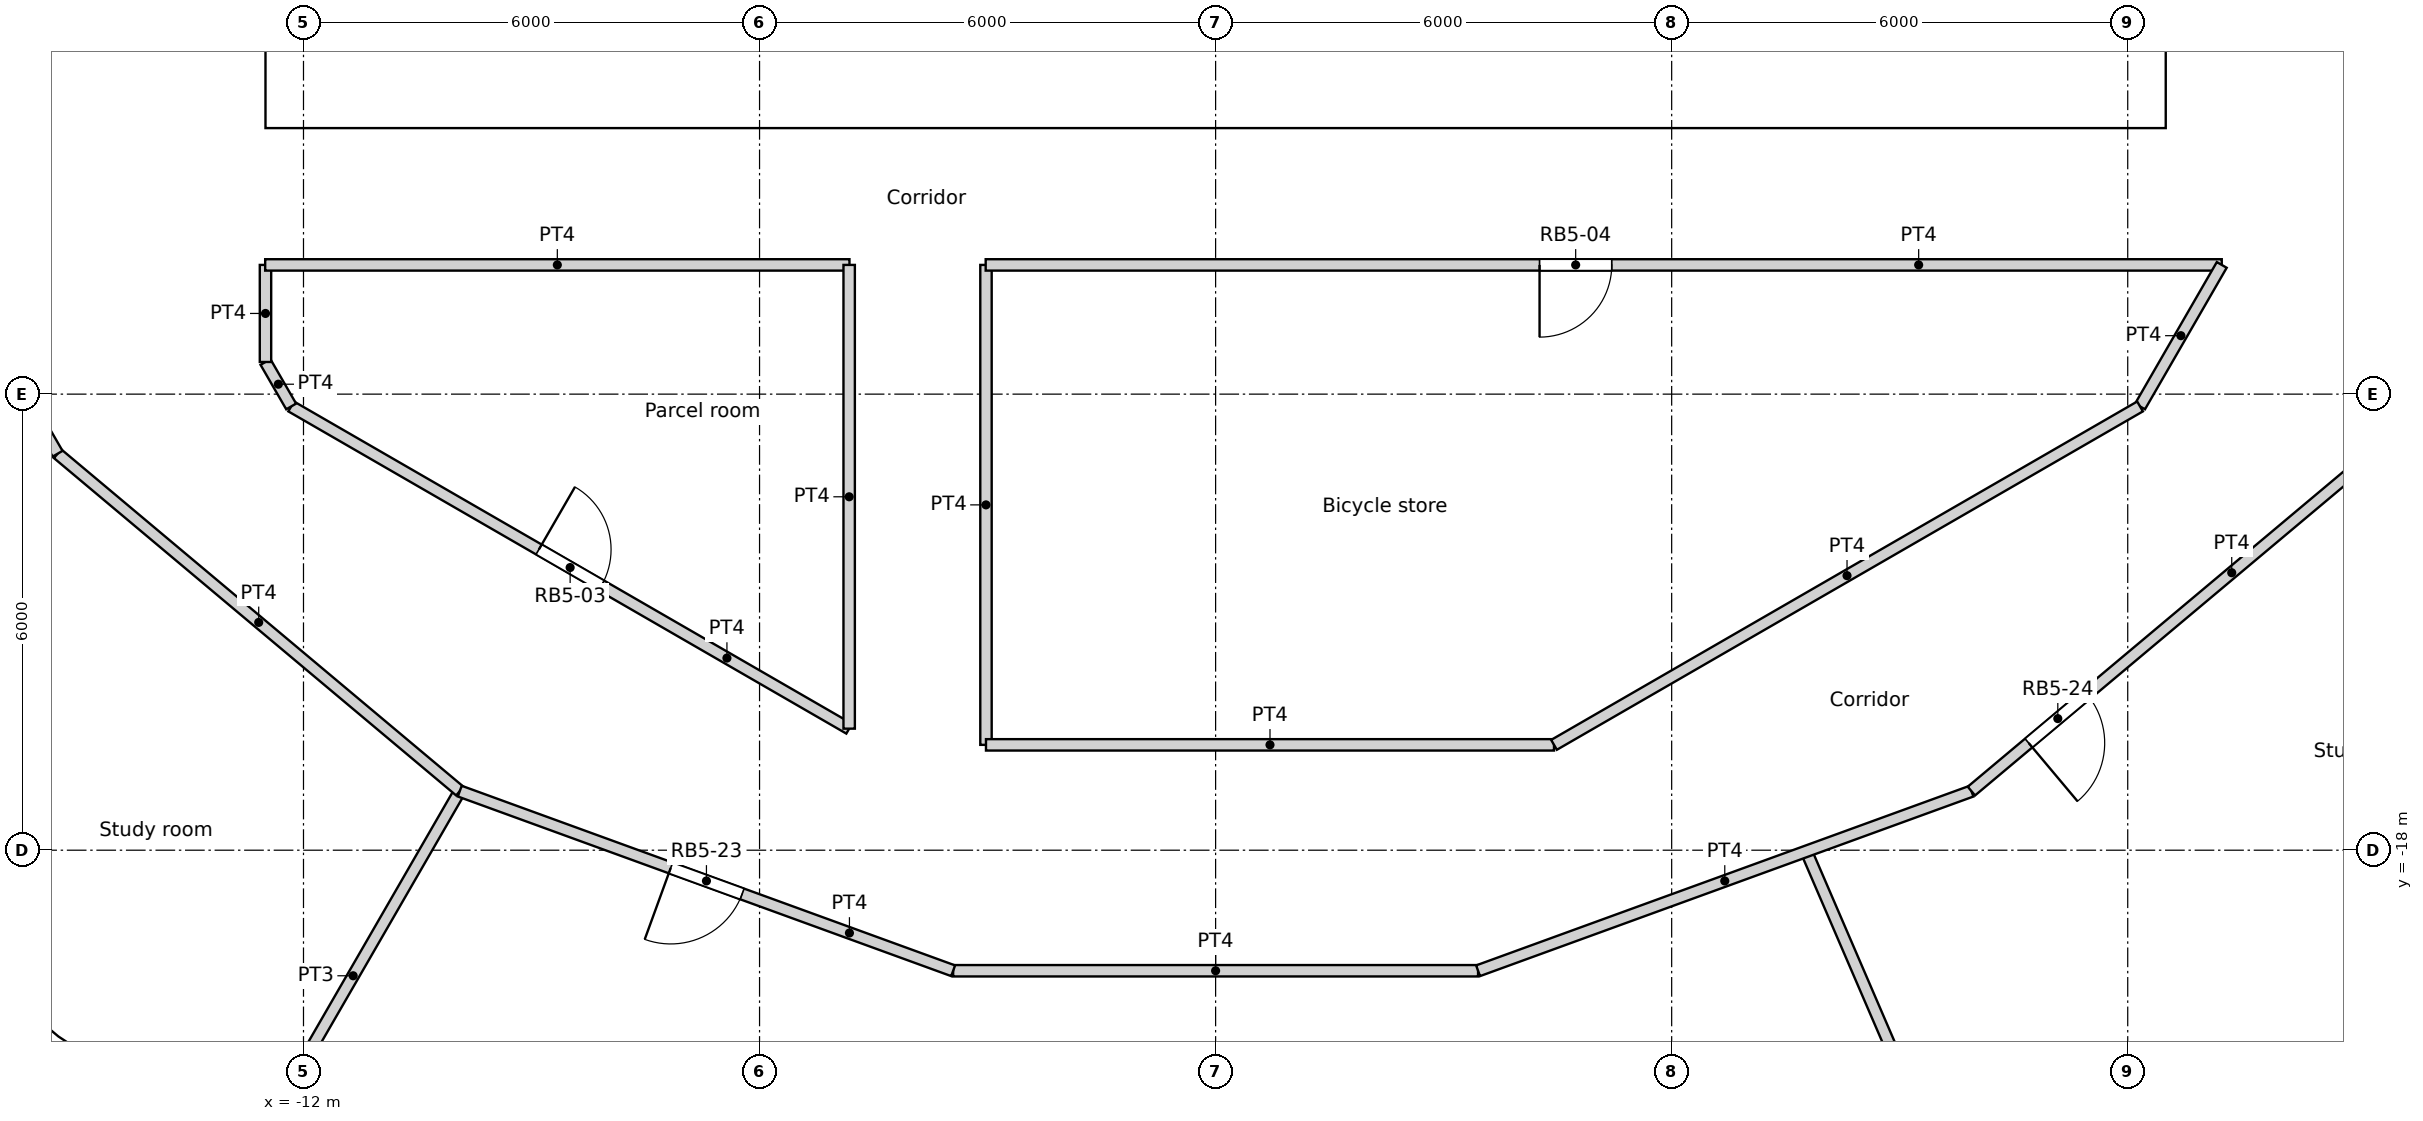
"""IFC4 building model, lengths in metres.
Left out: names, types, materials, properties, quantities, classifications, styles, units other than length and angle.
Written with IfcOpenShell. Run it as: python <this file> out.ifc"""

import sys

from ifc_helpers import new_model, si_unit, direction, frame, frame_2d, origin, origin_2d, place, context, subcontext, project, spatial, rectangle, circle, extrude, element, fill, save


model = new_model("IFC4")
c1 = context("Model", 3, precision=1e-05, world=origin(), true_north=direction((0.0, 1.0)))
c2 = subcontext(c1, "Body", "Model", "MODEL_VIEW")
j1 = project(units=[si_unit("LENGTHUNIT", "METRE"), si_unit("PLANEANGLEUNIT", "RADIAN")], contexts=[c1])
p1 = place(None, origin())
s1 = spatial("IfcSite", under=j1, at=p1, CompositionType="ELEMENT")
p2 = place(p1, origin())
s2 = spatial("IfcBuilding", under=s1, at=p2, CompositionType="ELEMENT")
p3 = place(p2, frame((0.0, 0.0, 169.2)))
s3 = spatial("IfcBuildingStorey", under=s2, at=p3, CompositionType="ELEMENT", Elevation=169.2)
p4 = place(p3, frame((14.659, -19.69, 0.0), z_axis=(0.0, 0.0, 1.0), x_axis=(1.0, 0.0, 0.0)))
e1 = element("IfcColumn", 1, at=p4, inside=s3, PredefinedType="COLUMN", context=c2, shape_type="SweptSolid", body=[
    extrude(circle(Radius=0.6, at=origin_2d()), origin(), (0.0, 0.0, 1.0), 3.6),
])
for number, where, z_axis, x_axis in (
    (2, (-13.798, -12.802, 0.0), (0.0, 0.0, 1.0), (1.0, 0.0, 0.0)),
    (3, (-9.411, -16.301, 0.0), (0.0, 0.0, 1.0), (1.0, 0.0, 0.0)),
    (4, (-4.188, -18.35, 0.0), (0.0, 0.0, 1.0), (1.0, 0.0, 0.0)),
    (5, (1.406, -18.77, 0.0), (0.0, 0.0, 1.0), (1.0, 0.0, 0.0)),
    (6, (6.876, -17.521, 0.0), (0.0, 0.0, 1.0), (1.0, 0.0, 0.0)),
    (7, (11.735, -14.716, 0.0), (0.0, 0.0, 1.0), (1.0, 0.0, 0.0)),
):
    element("IfcColumn", number, at=place(p3, frame(where, z_axis=z_axis, x_axis=x_axis)), inside=s3, PredefinedType="COLUMN", context=c2, shape_type="SweptSolid", body=[
        extrude(circle(Radius=0.65, at=origin_2d()), origin(), (0.0, 0.0, 1.0), 3.6),
    ])
p5 = place(p3, frame((-17.977, -19.09, -0.3), z_axis=(0.0, 0.0, 1.0), x_axis=(0.766022196139, -0.642814121673, 0.0)))
e8 = element("IfcWall", 8, at=p5, inside=s3, PredefinedType="ELEMENTEDWALL", context=c2, shape_type="SweptSolid", body=[
    extrude(rectangle(XDim=3.0, YDim=1.45, at=frame_2d((1.5, 0.0))), origin(), (0.0, 0.0, 1.0), 3.6),
])
p6 = place(p5, frame((1.5, 0.0, 1.85)))
e9 = element("IfcOpeningElement", 9, at=p6, cuts=e8, PredefinedType="OPENING", context=c2, shape_type="SweptSolid", body=[
    extrude(circle(Radius=0.9, at=origin_2d()), frame((0.0, 0.735, 0.0), z_axis=(0.0, -1.0, 0.0), x_axis=(1.0, 0.0, 0.0)), (0.0, 0.0, 1.0), 1.47),
])
p7 = place(p3, frame((-15.308, -20.578, 0.0), z_axis=(0.0, 0.0, 1.0), x_axis=(0.835470659512, -0.549535055382, 0.0)))
e10 = element("IfcWall", 10, at=p7, inside=s3, PredefinedType="SOLIDWALL", context=c2, shape_type="SweptSolid", body=[
    extrude(rectangle(XDim=2.973, YDim=0.3, at=frame_2d((1.487, 0.0))), origin(), (0.0, 0.0, 1.0), 3.3),
])
p8 = place(p7, frame((1.486, 0.0, 1.55)))
e11 = element("IfcOpeningElement", 11, at=p8, cuts=e10, PredefinedType="OPENING", context=c2, shape_type="SweptSolid", body=[
    extrude(circle(Radius=0.9, at=origin_2d()), frame((0.0, 0.16, 0.0), z_axis=(0.0, -1.0, 0.0), x_axis=(1.0, 0.0, 0.0)), (0.0, 0.0, 1.0), 0.32),
])
p9 = place(p3, frame((12.824, -22.211, 0.0), z_axis=(0.0, 0.0, 1.0), x_axis=(0.835470659512, 0.549535055382, 0.0)))
e12 = element("IfcWall", 12, at=p9, inside=s3, PredefinedType="SOLIDWALL", context=c2, shape_type="SweptSolid", body=[
    extrude(rectangle(XDim=2.973, YDim=0.3, at=frame_2d((1.487, 0.0))), origin(), (0.0, 0.0, 1.0), 3.3),
])
p10 = place(p9, frame((1.486, 0.0, 1.55)))
e13 = element("IfcOpeningElement", 13, at=p10, cuts=e12, PredefinedType="OPENING", context=c2, shape_type="SweptSolid", body=[
    extrude(circle(Radius=0.9, at=origin_2d()), frame((0.0, 0.16, 0.0), z_axis=(0.0, -1.0, 0.0), x_axis=(1.0, 0.0, 0.0)), (0.0, 0.0, 1.0), 0.32),
])
p11 = place(p3, frame((-12.5, -8.05, 0.0), z_axis=(0.0, 0.0, 1.0), x_axis=(1.0, 0.0, 0.0)))
e14 = element("IfcWall", 14, at=p11, inside=s3, PredefinedType="SOLIDWALL", context=c2, shape_type="SweptSolid", body=[
    extrude(rectangle(XDim=25.0, YDim=0.9, at=frame_2d((12.5, 0.0))), origin(), (0.0, 0.0, 1.0), 3.6),
])
p12 = place(p11, frame((13.4, 0.0, 0.0)))
e15 = element("IfcOpeningElement", 15, at=p12, cuts=e14, PredefinedType="OPENING", context=c2, shape_type="SweptSolid", body=[
    extrude(rectangle(XDim=1.0, YDim=2.1, at=frame_2d((0.5, 1.05))), frame((0.0, 0.45, 0.0), z_axis=(0.0, -1.0, 0.0), x_axis=(1.0, 0.0, 0.0)), (0.0, 0.0, 1.0), 0.9),
])
p13 = place(p11, frame((8.3, 0.0, 0.0)))
e16 = element("IfcOpeningElement", 16, at=p13, cuts=e14, PredefinedType="OPENING", context=c2, shape_type="SweptSolid", body=[
    extrude(rectangle(XDim=1.8, YDim=2.1, at=frame_2d((0.9, 1.05))), frame((0.0, 0.45, 0.0), z_axis=(0.0, -1.0, 0.0), x_axis=(1.0, 0.0, 0.0)), (0.0, 0.0, 1.0), 0.9),
])
p14 = place(p11, frame((14.9, 0.0, 0.0)))
e17 = element("IfcOpeningElement", 17, at=p14, cuts=e14, PredefinedType="OPENING", context=c2, shape_type="SweptSolid", body=[
    extrude(rectangle(XDim=1.8, YDim=2.1, at=frame_2d((0.9, 1.05))), frame((0.0, 0.45, 0.0), z_axis=(0.0, -1.0, 0.0), x_axis=(1.0, 0.0, 0.0)), (0.0, 0.0, 1.0), 0.9),
])
p15 = place(p3, frame((-12.05, -7.6, 0.0), z_axis=(0.0, 0.0, 1.0), x_axis=(0.0, 1.0, 0.0)))
e18 = element("IfcWall", 18, at=p15, inside=s3, PredefinedType="SOLIDWALL", context=c2, shape_type="SweptSolid", body=[
    extrude(rectangle(XDim=15.2, YDim=0.9, at=frame_2d((7.6, 0.0))), origin(), (0.0, 0.0, 1.0), 3.6),
])
p16 = place(p15, frame((7.1, 0.0, 0.0)))
e19 = element("IfcOpeningElement", 19, at=p16, cuts=e18, PredefinedType="OPENING", context=c2, shape_type="SweptSolid", body=[
    extrude(rectangle(XDim=1.0, YDim=2.1, at=frame_2d((0.5, 1.05))), frame((0.0, 0.45, 0.0), z_axis=(0.0, -1.0, 0.0), x_axis=(1.0, 0.0, 0.0)), (0.0, 0.0, 1.0), 0.9),
])
p17 = place(p3, frame((12.05, -7.6, 0.0), z_axis=(0.0, 0.0, 1.0), x_axis=(0.0, 1.0, 0.0)))
e20 = element("IfcWall", 20, at=p17, inside=s3, PredefinedType="SOLIDWALL", context=c2, shape_type="SweptSolid", body=[
    extrude(rectangle(XDim=15.2, YDim=0.9, at=frame_2d((7.6, 0.0))), origin(), (0.0, 0.0, 1.0), 3.6),
])
p18 = place(p17, frame((5.1, 0.0, 0.0)))
e21 = element("IfcOpeningElement", 21, at=p18, cuts=e20, PredefinedType="OPENING", context=c2, shape_type="SweptSolid", body=[
    extrude(rectangle(XDim=1.0, YDim=2.1, at=frame_2d((0.5, 1.05))), frame((0.0, 0.45, 0.0), z_axis=(0.0, -1.0, 0.0), x_axis=(1.0, 0.0, 0.0)), (0.0, 0.0, 1.0), 0.9),
])
for number, where, z_axis, x_axis in (
    (22, (0.55, -7.6, 0.0), (0.0, 0.0, 1.0), (0.0, 1.0, 0.0)),
    (23, (2.25, -7.6, 0.0), (0.0, 0.0, 1.0), (0.0, 1.0, 0.0)),
):
    element("IfcWall", number, at=place(p3, frame(where, z_axis=z_axis, x_axis=x_axis)), inside=s3, PredefinedType="SOLIDWALL", context=c2, shape_type="SweptSolid", body=[
        extrude(rectangle(XDim=4.35, YDim=0.3, at=frame_2d((2.175, 0.0))), origin(), (0.0, 0.0, 1.0), 3.3),
    ])
p19 = place(p3, frame((-9.05, -7.15, 0.0), z_axis=(0.0, 0.0, 1.0), x_axis=(1.0, 0.0, 0.0)))
e24 = element("IfcWall", 24, at=p19, inside=s3, PredefinedType="SOLIDWALL", context=c2, shape_type="SweptSolid", body=[
    extrude(rectangle(XDim=4.85, YDim=0.9, at=frame_2d((2.425, 0.0))), origin(), (0.0, 0.0, 1.0), 3.3),
])
p20 = place(p3, frame((-2.4, -7.15, 0.0), z_axis=(0.0, 0.0, 1.0), x_axis=(1.0, 0.0, 0.0)))
e25 = element("IfcWall", 25, at=p20, inside=s3, PredefinedType="SOLIDWALL", context=c2, shape_type="SweptSolid", body=[
    extrude(rectangle(XDim=2.8, YDim=0.9, at=frame_2d((1.4, 0.0))), origin(), (0.0, 0.0, 1.0), 3.3),
])
p21 = place(p3, frame((4.2, -7.15, 0.0), z_axis=(0.0, 0.0, 1.0), x_axis=(1.0, 0.0, 0.0)))
e26 = element("IfcWall", 26, at=p21, inside=s3, PredefinedType="SOLIDWALL", context=c2, shape_type="SweptSolid", body=[
    extrude(rectangle(XDim=4.85, YDim=0.9, at=frame_2d((2.425, 0.0))), origin(), (0.0, 0.0, 1.0), 3.3),
])
p22 = place(p3, frame((-12.504, -10.3, 0.0), z_axis=(0.0, 0.0, 1.0), x_axis=(1.0, 0.0, 0.0)))
e27 = element("IfcWall", 27, at=p22, inside=s3, PredefinedType="PARTITIONING", context=c2, shape_type="SweptSolid", body=[
    extrude(rectangle(XDim=7.687, YDim=0.15, at=frame_2d((3.844, 0.0))), origin(), (0.0, 0.0, 1.0), 3.3),
])
p23 = place(p3, frame((-3.025, -10.3, 0.0), z_axis=(0.0, 0.0, 1.0), x_axis=(1.0, 0.0, 0.0)))
e28 = element("IfcWall", 28, at=p23, inside=s3, PredefinedType="PARTITIONING", context=c2, shape_type="SweptSolid", body=[
    extrude(rectangle(XDim=16.262, YDim=0.15, at=frame_2d((8.131, 0.0))), origin(), (0.0, 0.0, 1.0), 3.3),
])
p24 = place(p23, frame((7.287, 0.0, 0.0)))
e29 = element("IfcOpeningElement", 29, at=p24, cuts=e28, PredefinedType="OPENING", context=c2, shape_type="SweptSolid", body=[
    extrude(rectangle(XDim=0.95, YDim=2.1, at=frame_2d((0.475, 1.05))), frame((0.0, 0.075, 0.0), z_axis=(0.0, -1.0, 0.0), x_axis=(1.0, 0.0, 0.0)), (0.0, 0.0, 1.0), 0.15),
])
p25 = place(p3, frame((12.162, -12.162, 0.0), z_axis=(0.0, 0.0, 1.0), x_axis=(0.499961633463, 0.866047553582, 0.0)))
e30 = element("IfcWall", 30, at=p25, inside=s3, PredefinedType="PARTITIONING", context=c2, shape_type="SweptSolid", body=[
    extrude(rectangle(XDim=2.15, YDim=0.15, at=frame_2d((1.075, 0.0))), origin(), (0.0, 0.0, 1.0), 3.3),
])
p26 = place(p3, frame((9.943, -17.222, 0.0), z_axis=(0.0, 0.0, 1.0), x_axis=(0.766192104565, 0.642611592567, 0.0)))
e31 = element("IfcWall", 31, at=p26, inside=s3, PredefinedType="PARTITIONING", context=c2, shape_type="SweptSolid", body=[
    extrude(rectangle(XDim=6.906, YDim=0.15, at=frame_2d((3.453, 0.0))), origin(), (0.0, 0.0, 1.0), 3.3),
])
p27 = place(p26, frame((0.984, 0.0, 0.0)))
e32 = element("IfcOpeningElement", 32, at=p27, cuts=e31, PredefinedType="OPENING", context=c2, shape_type="SweptSolid", body=[
    extrude(rectangle(XDim=1.0, YDim=2.04, at=frame_2d((0.5, 1.02))), frame((0.0, 0.075, 0.0), z_axis=(0.0, -1.0, 0.0), x_axis=(1.0, 0.0, 0.0)), (0.0, 0.0, 1.0), 0.15),
])
p28 = place(p3, frame((-12.5, -11.577, 0.0), z_axis=(0.0, 0.0, 1.0), x_axis=(0.0, 1.0, 0.0)))
e33 = element("IfcWall", 33, at=p28, inside=s3, PredefinedType="PARTITIONING", context=c2, shape_type="SweptSolid", body=[
    extrude(rectangle(XDim=1.277, YDim=0.15, at=frame_2d((0.638, 0.0))), origin(), (0.0, 0.0, 1.0), 3.3),
])
p29 = place(p3, frame((-12.5, -11.577, 0.0), z_axis=(0.0, 0.0, 1.0), x_axis=(0.500024767483, -0.866011103799, 0.0)))
e34 = element("IfcWall", 34, at=p29, inside=s3, PredefinedType="PARTITIONING", context=c2, shape_type="SweptSolid", body=[
    extrude(rectangle(XDim=0.676, YDim=0.15, at=frame_2d((0.338, 0.0))), origin(), (0.0, 0.0, 1.0), 3.3),
])
p30 = place(p3, frame((-15.235, -12.784, 0.0), z_axis=(0.0, 0.0, 1.0), x_axis=(0.766192104565, -0.642611592567, 0.0)))
e35 = element("IfcWall", 35, at=p30, inside=s3, PredefinedType="PARTITIONING", context=c2, shape_type="SweptSolid", body=[
    extrude(rectangle(XDim=6.906, YDim=0.15, at=frame_2d((3.453, 0.0))), origin(), (0.0, 0.0, 1.0), 3.3),
])
p31 = place(p3, frame((-18.688, -6.802, 0.0), z_axis=(0.0, 0.0, 1.0), x_axis=(0.499914202267, -0.866074933462, 0.0)))
e36 = element("IfcWall", 36, at=p31, inside=s3, PredefinedType="PARTITIONING", context=c2, shape_type="SweptSolid", body=[
    extrude(rectangle(XDim=6.907, YDim=0.15, at=frame_2d((3.454, 0.0))), origin(), (0.0, 0.0, 1.0), 3.3),
])
p32 = place(p31, frame((3.003, 0.0, 0.0)))
e37 = element("IfcOpeningElement", 37, at=p32, cuts=e36, PredefinedType="OPENING", context=c2, shape_type="SweptSolid", body=[
    extrude(rectangle(XDim=1.0, YDim=2.04, at=frame_2d((0.5, 1.02))), frame((0.0, 0.075, 0.0), z_axis=(0.0, -1.0, 0.0), x_axis=(1.0, 0.0, 0.0)), (0.0, 0.0, 1.0), 0.15),
])
p33 = place(p3, frame((-12.162, -12.162, 0.0), z_axis=(0.0, 0.0, 1.0), x_axis=(0.866004766557, -0.500035743023, 0.0)))
e38 = element("IfcWall", 38, at=p33, inside=s3, PredefinedType="PARTITIONING", context=c2, shape_type="SweptSolid", body=[
    extrude(rectangle(XDim=8.477, YDim=0.15, at=frame_2d((4.239, 0.0))), origin(), (0.0, 0.0, 1.0), 3.3),
])
p34 = place(p33, frame((3.763, 0.0, 0.0)))
e39 = element("IfcOpeningElement", 39, at=p34, cuts=e38, PredefinedType="OPENING", context=c2, shape_type="SweptSolid", body=[
    extrude(rectangle(XDim=0.95, YDim=2.1, at=frame_2d((0.475, 1.05))), frame((0.0, 0.075, 0.0), z_axis=(0.0, -1.0, 0.0), x_axis=(1.0, 0.0, 0.0)), (0.0, 0.0, 1.0), 0.15),
])
p35 = place(p3, frame((-4.821, -16.401, 0.0), z_axis=(0.0, 0.0, 1.0), x_axis=(0.0, 1.0, 0.0)))
e40 = element("IfcWall", 40, at=p35, inside=s3, PredefinedType="PARTITIONING", context=c2, shape_type="SweptSolid", body=[
    extrude(rectangle(XDim=6.101, YDim=0.15, at=frame_2d((3.05, 0.0))), origin(), (0.0, 0.0, 1.0), 3.3),
])
p36 = place(p3, frame((-3.021, -16.614, 0.0), z_axis=(0.0, 0.0, 1.0), x_axis=(0.0, 1.0, 0.0)))
e41 = element("IfcWall", 41, at=p36, inside=s3, PredefinedType="PARTITIONING", context=c2, shape_type="SweptSolid", body=[
    extrude(rectangle(XDim=6.314, YDim=0.15, at=frame_2d((3.157, 0.0))), origin(), (0.0, 0.0, 1.0), 3.3),
])
p37 = place(p3, frame((-3.021, -16.614, 0.0), z_axis=(0.0, 0.0, 1.0), x_axis=(1.0, 0.0, 0.0)))
e42 = element("IfcWall", 42, at=p37, inside=s3, PredefinedType="PARTITIONING", context=c2, shape_type="SweptSolid", body=[
    extrude(rectangle(XDim=7.473, YDim=0.15, at=frame_2d((3.736, 0.0))), origin(), (0.0, 0.0, 1.0), 3.3),
])
p38 = place(p3, frame((4.452, -16.614, 0.0), z_axis=(0.0, 0.0, 1.0), x_axis=(0.866005203721, 0.500034985904, 0.0)))
e43 = element("IfcWall", 43, at=p38, inside=s3, PredefinedType="PARTITIONING", context=c2, shape_type="SweptSolid", body=[
    extrude(rectangle(XDim=8.903, YDim=0.15, at=frame_2d((4.452, 0.0))), origin(), (0.0, 0.0, 1.0), 3.3),
])
p39 = place(p3, frame((3.453, -19.586, 0.0), z_axis=(0.0, 0.0, 1.0), x_axis=(0.939695353595, 0.342012634901, 0.0)))
e44 = element("IfcWall", 44, at=p39, inside=s3, PredefinedType="PARTITIONING", context=c2, shape_type="SweptSolid", body=[
    extrude(rectangle(XDim=6.908, YDim=0.15, at=frame_2d((3.454, 0.0))), origin(), (0.0, 0.0, 1.0), 3.3),
])
p40 = place(p3, frame((-3.453, -19.586, 0.0), z_axis=(0.0, 0.0, 1.0), x_axis=(1.0, 0.0, 0.0)))
e45 = element("IfcWall", 45, at=p40, inside=s3, PredefinedType="PARTITIONING", context=c2, shape_type="SweptSolid", body=[
    extrude(rectangle(XDim=6.906, YDim=0.15, at=frame_2d((3.453, 0.0))), origin(), (0.0, 0.0, 1.0), 3.3),
])
p41 = place(p3, frame((-9.944, -17.223, 0.0), z_axis=(0.0, 0.0, 1.0), x_axis=(0.939672634566, -0.342075050021, 0.0)))
e46 = element("IfcWall", 46, at=p41, inside=s3, PredefinedType="PARTITIONING", context=c2, shape_type="SweptSolid", body=[
    extrude(rectangle(XDim=6.908, YDim=0.15, at=frame_2d((3.454, 0.0))), origin(), (0.0, 0.0, 1.0), 3.3),
])
p42 = place(p41, frame((2.954, 0.0, 0.0)))
e47 = element("IfcOpeningElement", 47, at=p42, cuts=e46, PredefinedType="OPENING", context=c2, shape_type="SweptSolid", body=[
    extrude(rectangle(XDim=1.0, YDim=2.04, at=frame_2d((0.5, 1.02))), frame((0.0, 0.075, 0.0), z_axis=(0.0, -1.0, 0.0), x_axis=(1.0, 0.0, 0.0)), (0.0, 0.0, 1.0), 0.15),
])
p43 = place(p3, frame((-12.749, -22.081, 0.0), z_axis=(0.0, 0.0, 1.0), x_axis=(0.500010020406, 0.866019618423, 0.0)))
e48 = element("IfcWall", 48, at=p43, inside=s3, PredefinedType="PARTITIONING", context=c2, shape_type="SweptSolid", body=[
    extrude(rectangle(XDim=5.61, YDim=0.15, at=frame_2d((2.805, 0.0))), origin(), (0.0, 0.0, 1.0), 3.3),
])
p44 = place(p3, frame((7.771, -18.014, 0.0), z_axis=(0.0, 0.0, 1.0), x_axis=(0.39601833725, -0.918242602236, 0.0)))
e49 = element("IfcWall", 49, at=p44, inside=s3, PredefinedType="PARTITIONING", context=c2, shape_type="SweptSolid", body=[
    extrude(rectangle(XDim=5.879, YDim=0.15, at=frame_2d((2.939, 0.0))), origin(), (0.0, 0.0, 1.0), 3.3),
])
p45 = place(p12, origin())
e50 = element("IfcDoor", 50, at=p45, inside=s3, OperationType="SINGLE_SWING_LEFT", PredefinedType="DOOR", context=c2, shape_type="SweptSolid", body=[
    extrude(rectangle(XDim=1.0, YDim=2.1, at=frame_2d((0.5, 1.05))), frame((0.0, 0.025, 0.0), z_axis=(0.0, -1.0, 0.0), x_axis=(1.0, 0.0, 0.0)), (0.0, 0.0, 1.0), 0.05),
])
fill(e15, e50)
p46 = place(p13, origin())
e51 = element("IfcDoor", 51, at=p46, inside=s3, OperationType="DOUBLE_DOOR_SINGLE_SWING", PredefinedType="DOOR", context=c2, shape_type="SweptSolid", body=[
    extrude(rectangle(XDim=1.8, YDim=2.1, at=frame_2d((0.9, 1.05))), frame((0.0, 0.025, 0.0), z_axis=(0.0, -1.0, 0.0), x_axis=(1.0, 0.0, 0.0)), (0.0, 0.0, 1.0), 0.05),
])
fill(e16, e51)
p47 = place(p14, origin())
e52 = element("IfcDoor", 52, at=p47, inside=s3, OperationType="DOUBLE_DOOR_SINGLE_SWING", PredefinedType="DOOR", context=c2, shape_type="SweptSolid", body=[
    extrude(rectangle(XDim=1.8, YDim=2.1, at=frame_2d((0.9, 1.05))), frame((0.0, 0.025, 0.0), z_axis=(0.0, -1.0, 0.0), x_axis=(1.0, 0.0, 0.0)), (0.0, 0.0, 1.0), 0.05),
])
fill(e17, e52)
p48 = place(p34, origin())
e53 = element("IfcDoor", 53, at=p48, inside=s3, OperationType="SINGLE_SWING_LEFT", PredefinedType="DOOR", context=c2, shape_type="SweptSolid", body=[
    extrude(rectangle(XDim=0.95, YDim=2.1, at=frame_2d((0.475, 1.05))), frame((0.0, 0.025, 0.0), z_axis=(0.0, -1.0, 0.0), x_axis=(1.0, 0.0, 0.0)), (0.0, 0.0, 1.0), 0.05),
])
fill(e39, e53)
p49 = place(p24, origin())
e54 = element("IfcDoor", 54, at=p49, inside=s3, OperationType="SINGLE_SWING_RIGHT", PredefinedType="DOOR", context=c2, shape_type="SweptSolid", body=[
    extrude(rectangle(XDim=0.95, YDim=2.1, at=frame_2d((0.475, 1.05))), frame((0.0, 0.025, 0.0), z_axis=(0.0, -1.0, 0.0), x_axis=(1.0, 0.0, 0.0)), (0.0, 0.0, 1.0), 0.05),
])
fill(e29, e54)
p50 = place(p42, origin())
e55 = element("IfcDoor", 55, at=p50, inside=s3, OperationType="SINGLE_SWING_RIGHT", PredefinedType="DOOR", context=c2, shape_type="SweptSolid", body=[
    extrude(rectangle(XDim=1.0, YDim=2.04, at=frame_2d((0.5, 1.02))), frame((0.0, 0.025, 0.0), z_axis=(0.0, -1.0, 0.0), x_axis=(1.0, 0.0, 0.0)), (0.0, 0.0, 1.0), 0.05),
])
fill(e47, e55)
p51 = place(p27, origin())
e56 = element("IfcDoor", 56, at=p51, inside=s3, OperationType="SINGLE_SWING_RIGHT", PredefinedType="DOOR", context=c2, shape_type="SweptSolid", body=[
    extrude(rectangle(XDim=1.0, YDim=2.04, at=frame_2d((0.5, 1.02))), frame((0.0, 0.025, 0.0), z_axis=(0.0, -1.0, 0.0), x_axis=(1.0, 0.0, 0.0)), (0.0, 0.0, 1.0), 0.05),
])
fill(e32, e56)
save(model, sys.argv[1])
